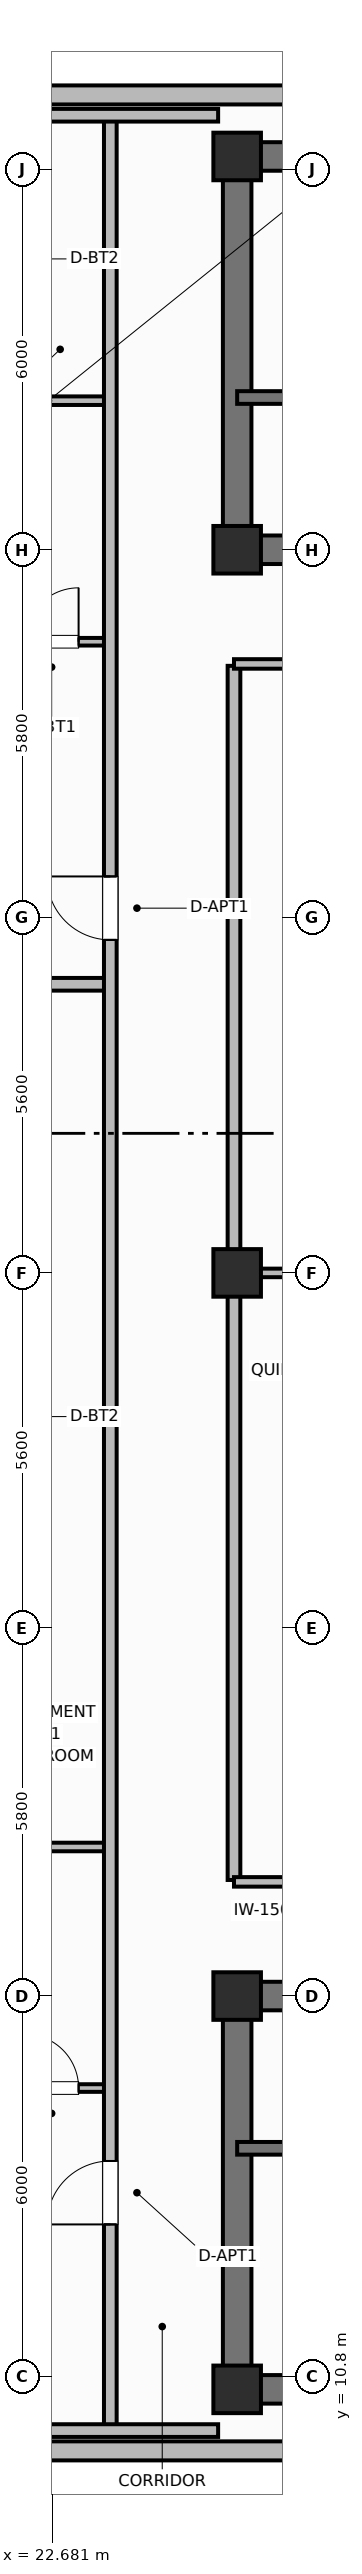
"""IFC4 building model, lengths in metres.
Left out: names, types, materials, properties, quantities, classifications, styles, units other than length and angle.
Written with IfcOpenShell. Run it as: python <this file> out.ifc"""

import sys

from ifc_helpers import new_model, si_unit, direction, frame, frame_2d, origin, origin_2d, place, context, subcontext, project, spatial, rectangle, extrude, element, fill, save


model = new_model("IFC4")
c1 = context("Model", 3, precision=1e-05, world=origin(), true_north=direction((0.0, 1.0)))
c2 = subcontext(c1, "Body", "Model", "MODEL_VIEW")
j1 = project(units=[si_unit("LENGTHUNIT", "METRE"), si_unit("PLANEANGLEUNIT", "RADIAN")], contexts=[c1])
p1 = place(None, origin())
s1 = spatial("IfcSite", under=j1, at=p1, CompositionType="ELEMENT")
p2 = place(p1, origin())
s2 = spatial("IfcBuilding", under=s1, at=p2, CompositionType="ELEMENT")
p3 = place(p2, frame((0.0, 0.0, 289.8)))
s3 = spatial("IfcBuildingStorey", under=s2, at=p3, CompositionType="ELEMENT", Elevation=289.8)
p4 = place(p3, frame((52.8, 10.6, 0.0), z_axis=(0.0, 0.0, 1.0), x_axis=(-1.0, 0.0, 0.0)))
e1 = element("IfcWall", 1, at=p4, inside=s3, PredefinedType="SHEAR", context=c2, shape_type="SweptSolid", body=[
    extrude(rectangle(XDim=27.2, YDim=0.45, at=frame_2d((13.6, 0.0))), origin(), (0.0, 0.0, 1.0), 3.7),
])
p5 = place(p3, frame((25.6, 10.825, 0.0), z_axis=(0.0, 0.0, 1.0), x_axis=(0.0, 1.0, 0.0)))
e2 = element("IfcWall", 2, at=p5, inside=s3, PredefinedType="SHEAR", context=c2, shape_type="SweptSolid", body=[
    extrude(rectangle(XDim=5.75, YDim=0.45, at=frame_2d((2.875, 0.0))), origin(), (0.0, 0.0, 1.0), 3.7),
])
p6 = place(p3, frame((25.6, 16.8, 0.0), z_axis=(0.0, 0.0, 1.0), x_axis=(1.0, 0.0, 0.0)))
e3 = element("IfcWall", 3, at=p6, inside=s3, PredefinedType="SHEAR", context=c2, shape_type="SweptSolid", body=[
    extrude(rectangle(XDim=27.2, YDim=0.45, at=frame_2d((13.6, 0.0))), origin(), (0.0, 0.0, 1.0), 3.7),
])
p7 = place(p6, frame((1.7, 0.0, 0.0)))
e4 = element("IfcOpeningElement", 4, at=p7, cuts=e3, PredefinedType="OPENING", context=c2, shape_type="SweptSolid", body=[
    extrude(rectangle(XDim=1.1, YDim=2.15, at=frame_2d((0.55, 1.075))), frame((0.0, 0.235, 0.0), z_axis=(0.0, -1.0, 0.0), x_axis=(1.0, 0.0, 0.0)), (0.0, 0.0, 1.0), 0.47),
])
p8 = place(p6, frame((4.45, 0.0, 0.0)))
e5 = element("IfcOpeningElement", 5, at=p8, cuts=e3, PredefinedType="OPENING", context=c2, shape_type="SweptSolid", body=[
    extrude(rectangle(XDim=0.85, YDim=2.1, at=frame_2d((0.425, 1.05))), frame((0.0, 0.235, 0.0), z_axis=(0.0, -1.0, 0.0), x_axis=(1.0, 0.0, 0.0)), (0.0, 0.0, 1.0), 0.47),
])
p9 = place(p6, frame((6.5, 0.0, 0.0)))
e6 = element("IfcOpeningElement", 6, at=p9, cuts=e3, PredefinedType="OPENING", context=c2, shape_type="SweptSolid", body=[
    extrude(rectangle(XDim=0.85, YDim=2.1, at=frame_2d((0.425, 1.05))), frame((0.0, 0.235, 0.0), z_axis=(0.0, -1.0, 0.0), x_axis=(1.0, 0.0, 0.0)), (0.0, 0.0, 1.0), 0.47),
])
p10 = place(p6, frame((13.0, 0.0, 0.0)))
e7 = element("IfcOpeningElement", 7, at=p10, cuts=e3, PredefinedType="OPENING", context=c2, shape_type="SweptSolid", body=[
    extrude(rectangle(XDim=1.2, YDim=2.15, at=frame_2d((0.6, 1.075))), frame((0.0, 0.235, 0.0), z_axis=(0.0, -1.0, 0.0), x_axis=(1.0, 0.0, 0.0)), (0.0, 0.0, 1.0), 0.47),
])
p11 = place(p6, frame((19.8, 0.0, 0.0)))
e8 = element("IfcOpeningElement", 8, at=p11, cuts=e3, PredefinedType="OPENING", context=c2, shape_type="SweptSolid", body=[
    extrude(rectangle(XDim=0.85, YDim=2.1, at=frame_2d((0.425, 1.05))), frame((0.0, 0.235, 0.0), z_axis=(0.0, -1.0, 0.0), x_axis=(1.0, 0.0, 0.0)), (0.0, 0.0, 1.0), 0.47),
])
p12 = place(p6, frame((24.2, 0.0, 0.0)))
e9 = element("IfcOpeningElement", 9, at=p12, cuts=e3, PredefinedType="OPENING", context=c2, shape_type="SweptSolid", body=[
    extrude(rectangle(XDim=0.85, YDim=2.1, at=frame_2d((0.425, 1.05))), frame((0.0, 0.235, 0.0), z_axis=(0.0, -1.0, 0.0), x_axis=(1.0, 0.0, 0.0)), (0.0, 0.0, 1.0), 0.47),
])
p13 = place(p3, frame((25.6, 45.8, 0.0), z_axis=(0.0, 0.0, 1.0), x_axis=(1.0, 0.0, 0.0)))
e10 = element("IfcWall", 10, at=p13, inside=s3, PredefinedType="SHEAR", context=c2, shape_type="SweptSolid", body=[
    extrude(rectangle(XDim=27.2, YDim=0.45, at=frame_2d((13.6, 0.0))), origin(), (0.0, 0.0, 1.0), 3.7),
])
p14 = place(p3, frame((25.6, 39.825, 0.0), z_axis=(0.0, 0.0, 1.0), x_axis=(0.0, 1.0, 0.0)))
e11 = element("IfcWall", 11, at=p14, inside=s3, PredefinedType="SHEAR", context=c2, shape_type="SweptSolid", body=[
    extrude(rectangle(XDim=5.75, YDim=0.45, at=frame_2d((2.875, 0.0))), origin(), (0.0, 0.0, 1.0), 3.7),
])
p15 = place(p3, frame((52.8, 39.6, 0.0), z_axis=(0.0, 0.0, 1.0), x_axis=(-1.0, 0.0, 0.0)))
e12 = element("IfcWall", 12, at=p15, inside=s3, PredefinedType="SHEAR", context=c2, shape_type="SweptSolid", body=[
    extrude(rectangle(XDim=27.2, YDim=0.45, at=frame_2d((13.6, 0.0))), origin(), (0.0, 0.0, 1.0), 3.7),
])
p16 = place(p15, frame((24.3, 0.0, 0.0)))
e13 = element("IfcOpeningElement", 13, at=p16, cuts=e12, PredefinedType="OPENING", context=c2, shape_type="SweptSolid", body=[
    extrude(rectangle(XDim=1.1, YDim=2.15, at=frame_2d((0.55, 1.075))), frame((0.0, 0.235, 0.0), z_axis=(0.0, -1.0, 0.0), x_axis=(1.0, 0.0, 0.0)), (0.0, 0.0, 1.0), 0.47),
])
p17 = place(p15, frame((21.85, 0.0, 0.0)))
e14 = element("IfcOpeningElement", 14, at=p17, cuts=e12, PredefinedType="OPENING", context=c2, shape_type="SweptSolid", body=[
    extrude(rectangle(XDim=0.85, YDim=2.1, at=frame_2d((0.425, 1.05))), frame((0.0, 0.235, 0.0), z_axis=(0.0, -1.0, 0.0), x_axis=(1.0, 0.0, 0.0)), (0.0, 0.0, 1.0), 0.47),
])
p18 = place(p15, frame((19.85, 0.0, 0.0)))
e15 = element("IfcOpeningElement", 15, at=p18, cuts=e12, PredefinedType="OPENING", context=c2, shape_type="SweptSolid", body=[
    extrude(rectangle(XDim=0.85, YDim=2.1, at=frame_2d((0.425, 1.05))), frame((0.0, 0.235, 0.0), z_axis=(0.0, -1.0, 0.0), x_axis=(1.0, 0.0, 0.0)), (0.0, 0.0, 1.0), 0.47),
])
p19 = place(p15, frame((15.1, 0.0, 0.0)))
e16 = element("IfcOpeningElement", 16, at=p19, cuts=e12, PredefinedType="OPENING", context=c2, shape_type="SweptSolid", body=[
    extrude(rectangle(XDim=1.2, YDim=2.15, at=frame_2d((0.6, 1.075))), frame((0.0, 0.235, 0.0), z_axis=(0.0, -1.0, 0.0), x_axis=(1.0, 0.0, 0.0)), (0.0, 0.0, 1.0), 0.47),
])
p20 = place(p15, frame((12.6, 0.0, 0.0)))
e17 = element("IfcOpeningElement", 17, at=p20, cuts=e12, PredefinedType="OPENING", context=c2, shape_type="SweptSolid", body=[
    extrude(rectangle(XDim=0.85, YDim=2.1, at=frame_2d((0.425, 1.05))), frame((0.0, 0.235, 0.0), z_axis=(0.0, -1.0, 0.0), x_axis=(1.0, 0.0, 0.0)), (0.0, 0.0, 1.0), 0.47),
])
p21 = place(p15, frame((10.85, 0.0, 0.0)))
e18 = element("IfcOpeningElement", 18, at=p21, cuts=e12, PredefinedType="OPENING", context=c2, shape_type="SweptSolid", body=[
    extrude(rectangle(XDim=0.85, YDim=2.1, at=frame_2d((0.425, 1.05))), frame((0.0, 0.235, 0.0), z_axis=(0.0, -1.0, 0.0), x_axis=(1.0, 0.0, 0.0)), (0.0, 0.0, 1.0), 0.47),
])
p22 = place(p15, frame((7.35, 0.0, 0.0)))
e19 = element("IfcOpeningElement", 19, at=p22, cuts=e12, PredefinedType="OPENING", context=c2, shape_type="SweptSolid", body=[
    extrude(rectangle(XDim=0.85, YDim=2.1, at=frame_2d((0.425, 1.05))), frame((0.0, 0.235, 0.0), z_axis=(0.0, -1.0, 0.0), x_axis=(1.0, 0.0, 0.0)), (0.0, 0.0, 1.0), 0.47),
])
p23 = place(p15, frame((4.2, 0.0, 0.0)))
e20 = element("IfcOpeningElement", 20, at=p23, cuts=e12, PredefinedType="OPENING", context=c2, shape_type="SweptSolid", body=[
    extrude(rectangle(XDim=1.3, YDim=2.2, at=frame_2d((0.65, 1.1))), frame((0.0, 0.235, 0.0), z_axis=(0.0, -1.0, 0.0), x_axis=(1.0, 0.0, 0.0)), (0.0, 0.0, 1.0), 0.47),
])
for number, where, z_axis, x_axis in (
    (21, (25.6, 10.6, 0.0), (0.0, 0.0, 1.0), (1.0, 0.0, 0.0)),
    (22, (25.6, 16.8, 0.0), (0.0, 0.0, 1.0), (1.0, 0.0, 0.0)),
    (23, (25.6, 39.6, 0.0), (0.0, 0.0, 1.0), (1.0, 0.0, 0.0)),
    (24, (25.6, 45.8, 0.0), (0.0, 0.0, 1.0), (1.0, 0.0, 0.0)),
    (25, (25.6, 28.2, 0.0), (0.0, 0.0, 1.0), (1.0, 0.0, 0.0)),
):
    element("IfcColumn", number, at=place(p3, frame(where, z_axis=z_axis, x_axis=x_axis)), inside=s3, PredefinedType="COLUMN", context=c2, shape_type="SweptSolid", body=[
        extrude(rectangle(XDim=0.75, YDim=0.75, at=origin_2d()), origin(), (0.0, 0.0, 1.0), 3.7),
    ])
p24 = place(p3, frame((22.56, 9.63, 0.0), z_axis=(0.0, 0.0, 1.0), x_axis=(1.0, 0.0, 0.0)))
e26 = element("IfcWall", 26, at=p24, inside=s3, PredefinedType="SOLIDWALL", context=c2, shape_type="SweptSolid", body=[
    extrude(rectangle(XDim=4.45, YDim=0.3, at=frame_2d((2.225, 0.0))), origin(), (0.0, 0.0, 1.0), 2.73),
])
p25 = place(p3, frame((48.19, 46.77, 0.0), z_axis=(0.0, 0.0, 1.0), x_axis=(-1.0, 0.0, 0.0)))
e27 = element("IfcWall", 27, at=p25, inside=s3, PredefinedType="SOLIDWALL", context=c2, shape_type="SweptSolid", body=[
    extrude(rectangle(XDim=25.63, YDim=0.3, at=frame_2d((12.815, 0.0))), origin(), (0.0, 0.0, 1.0), 2.73),
])
p26 = place(p25, frame((1.371, 0.0, 0.71)))
e28 = element("IfcOpeningElement", 28, at=p26, cuts=e27, PredefinedType="OPENING", context=c2, shape_type="SweptSolid", body=[
    extrude(rectangle(XDim=1.6, YDim=1.9, at=frame_2d((0.8, 0.95))), frame((0.0, 0.16, 0.0), z_axis=(0.0, -1.0, 0.0), x_axis=(1.0, 0.0, 0.0)), (0.0, 0.0, 1.0), 0.32),
])
p27 = place(p25, frame((7.453, 0.0, 0.71)))
e29 = element("IfcOpeningElement", 29, at=p27, cuts=e27, PredefinedType="OPENING", context=c2, shape_type="SweptSolid", body=[
    extrude(rectangle(XDim=1.6, YDim=1.9, at=frame_2d((0.8, 0.95))), frame((0.0, 0.16, 0.0), z_axis=(0.0, -1.0, 0.0), x_axis=(1.0, 0.0, 0.0)), (0.0, 0.0, 1.0), 0.32),
])
p28 = place(p25, frame((10.144, 0.0, 0.71)))
e30 = element("IfcOpeningElement", 30, at=p28, cuts=e27, PredefinedType="OPENING", context=c2, shape_type="SweptSolid", body=[
    extrude(rectangle(XDim=1.6, YDim=1.9, at=frame_2d((0.8, 0.95))), frame((0.0, 0.16, 0.0), z_axis=(0.0, -1.0, 0.0), x_axis=(1.0, 0.0, 0.0)), (0.0, 0.0, 1.0), 0.32),
])
p29 = place(p25, frame((14.586, 0.0, 0.71)))
e31 = element("IfcOpeningElement", 31, at=p29, cuts=e27, PredefinedType="OPENING", context=c2, shape_type="SweptSolid", body=[
    extrude(rectangle(XDim=1.6, YDim=1.9, at=frame_2d((0.8, 0.95))), frame((0.0, 0.16, 0.0), z_axis=(0.0, -1.0, 0.0), x_axis=(1.0, 0.0, 0.0)), (0.0, 0.0, 1.0), 0.32),
])
p30 = place(p25, frame((16.927, 0.0, 0.71)))
e32 = element("IfcOpeningElement", 32, at=p30, cuts=e27, PredefinedType="OPENING", context=c2, shape_type="SweptSolid", body=[
    extrude(rectangle(XDim=1.6, YDim=1.9, at=frame_2d((0.8, 0.95))), frame((0.0, 0.16, 0.0), z_axis=(0.0, -1.0, 0.0), x_axis=(1.0, 0.0, 0.0)), (0.0, 0.0, 1.0), 0.32),
])
p31 = place(p25, frame((19.618, 0.0, 0.71)))
e33 = element("IfcOpeningElement", 33, at=p31, cuts=e27, PredefinedType="OPENING", context=c2, shape_type="SweptSolid", body=[
    extrude(rectangle(XDim=1.6, YDim=1.9, at=frame_2d((0.8, 0.95))), frame((0.0, 0.16, 0.0), z_axis=(0.0, -1.0, 0.0), x_axis=(1.0, 0.0, 0.0)), (0.0, 0.0, 1.0), 0.32),
])
p32 = place(p3, frame((25.6, 14.4, 0.0), z_axis=(0.0, 0.0, 1.0), x_axis=(1.0, 0.0, 0.0)))
e34 = element("IfcWall", 34, at=p32, inside=s3, PredefinedType="SHEAR", context=c2, shape_type="SweptSolid", body=[
    extrude(rectangle(XDim=9.55, YDim=0.2, at=frame_2d((4.775, 0.0))), origin(), (0.0, 0.0, 1.0), 3.7),
])
p33 = place(p32, frame((1.05, 0.0, 0.0)))
e35 = element("IfcOpeningElement", 35, at=p33, cuts=e34, PredefinedType="OPENING", context=c2, shape_type="SweptSolid", body=[
    extrude(rectangle(XDim=1.1, YDim=2.15, at=frame_2d((0.55, 1.075))), frame((0.0, 0.11, 0.0), z_axis=(0.0, -1.0, 0.0), x_axis=(1.0, 0.0, 0.0)), (0.0, 0.0, 1.0), 0.22),
])
p34 = place(p3, frame((35.15, 42.0, 0.0), z_axis=(0.0, 0.0, 1.0), x_axis=(-1.0, 0.0, 0.0)))
e36 = element("IfcWall", 36, at=p34, inside=s3, PredefinedType="SHEAR", context=c2, shape_type="SweptSolid", body=[
    extrude(rectangle(XDim=9.55, YDim=0.2, at=frame_2d((4.775, 0.0))), origin(), (0.0, 0.0, 1.0), 3.7),
])
p35 = place(p34, frame((7.25, 0.0, 0.0)))
e37 = element("IfcOpeningElement", 37, at=p35, cuts=e36, PredefinedType="OPENING", context=c2, shape_type="SweptSolid", body=[
    extrude(rectangle(XDim=1.1, YDim=2.15, at=frame_2d((0.55, 1.075))), frame((0.0, 0.11, 0.0), z_axis=(0.0, -1.0, 0.0), x_axis=(1.0, 0.0, 0.0)), (0.0, 0.0, 1.0), 0.22),
])
p36 = place(p3, frame((25.55, 18.63, 0.0), z_axis=(0.0, 0.0, 1.0), x_axis=(0.0, 1.0, 0.0)))
e38 = element("IfcWall", 38, at=p36, inside=s3, PredefinedType="PARTITIONING", context=c2, shape_type="SweptSolid", body=[
    extrude(rectangle(XDim=19.14, YDim=0.2, at=frame_2d((9.57, 0.0))), origin(), (0.0, 0.0, 1.0), 2.56),
])
for number, where, z_axis, x_axis in (
    (39, (25.55, 18.6, 0.0), (0.0, 0.0, 1.0), (1.0, 0.0, 0.0)),
    (40, (25.55, 37.8, 0.0), (0.0, 0.0, 1.0), (1.0, 0.0, 0.0)),
):
    element("IfcWall", number, at=place(p3, frame(where, z_axis=z_axis, x_axis=x_axis)), inside=s3, PredefinedType="PARTITIONING", context=c2, shape_type="SweptSolid", body=[
        extrude(rectangle(XDim=2.7, YDim=0.15, at=frame_2d((1.35, 0.0))), origin(), (0.0, 0.0, 1.0), 2.56),
    ])
p37 = place(p3, frame((25.6, 28.2, 0.0), z_axis=(0.0, 0.0, 1.0), x_axis=(1.0, 0.0, 0.0)))
e41 = element("IfcWall", 41, at=p37, inside=s3, PredefinedType="PARTITIONING", context=c2, shape_type="SweptSolid", body=[
    extrude(rectangle(XDim=2.66, YDim=0.135, at=frame_2d((1.33, 0.0))), origin(), (0.0, 0.0, 1.0), 2.56),
])
p38 = place(p3, frame((21.65, 15.35, 0.0), z_axis=(0.0, 0.0, 1.0), x_axis=(1.0, 0.0, 0.0)))
e42 = element("IfcWall", 42, at=p38, inside=s3, PredefinedType="PARTITIONING", context=c2, shape_type="SweptSolid", body=[
    extrude(rectangle(XDim=1.95, YDim=0.12, at=frame_2d((0.975, 0.0))), origin(), (0.0, 0.0, 1.0), 2.56),
])
p39 = place(p38, frame((0.6, 0.0, 0.0)))
e43 = element("IfcOpeningElement", 43, at=p39, cuts=e42, PredefinedType="OPENING", context=c2, shape_type="SweptSolid", body=[
    extrude(rectangle(XDim=0.85, YDim=2.1, at=frame_2d((0.425, 1.05))), frame((0.0, 0.07, 0.0), z_axis=(0.0, -1.0, 0.0), x_axis=(1.0, 0.0, 0.0)), (0.0, 0.0, 1.0), 0.14),
])
p40 = place(p3, frame((21.65, 19.15, 0.0), z_axis=(0.0, 0.0, 1.0), x_axis=(1.0, 0.0, 0.0)))
e44 = element("IfcWall", 44, at=p40, inside=s3, PredefinedType="PARTITIONING", context=c2, shape_type="SweptSolid", body=[
    extrude(rectangle(XDim=1.95, YDim=0.135, at=frame_2d((0.975, 0.0))), origin(), (0.0, 0.0, 1.0), 2.56),
])
p41 = place(p3, frame((19.53, 32.75, 0.0), z_axis=(0.0, 0.0, 1.0), x_axis=(1.0, 0.0, 0.0)))
e45 = element("IfcWall", 45, at=p41, inside=s3, PredefinedType="PARTITIONING", context=c2, shape_type="SweptSolid", body=[
    extrude(rectangle(XDim=4.07, YDim=0.2, at=frame_2d((2.035, 0.0))), origin(), (0.0, 0.0, 1.0), 2.56),
])
p42 = place(p3, frame((21.65, 38.15, 0.0), z_axis=(0.0, 0.0, 1.0), x_axis=(1.0, 0.0, 0.0)))
e46 = element("IfcWall", 46, at=p42, inside=s3, PredefinedType="PARTITIONING", context=c2, shape_type="SweptSolid", body=[
    extrude(rectangle(XDim=1.95, YDim=0.12, at=frame_2d((0.975, 0.0))), origin(), (0.0, 0.0, 1.0), 2.56),
])
p43 = place(p42, frame((0.6, 0.0, 0.0)))
e47 = element("IfcOpeningElement", 47, at=p43, cuts=e46, PredefinedType="OPENING", context=c2, shape_type="SweptSolid", body=[
    extrude(rectangle(XDim=0.85, YDim=2.1, at=frame_2d((0.425, 1.05))), frame((0.0, 0.07, 0.0), z_axis=(0.0, -1.0, 0.0), x_axis=(1.0, 0.0, 0.0)), (0.0, 0.0, 1.0), 0.14),
])
p44 = place(p3, frame((21.65, 41.95, 0.0), z_axis=(0.0, 0.0, 1.0), x_axis=(1.0, 0.0, 0.0)))
e48 = element("IfcWall", 48, at=p44, inside=s3, PredefinedType="PARTITIONING", context=c2, shape_type="SweptSolid", body=[
    extrude(rectangle(XDim=1.95, YDim=0.135, at=frame_2d((0.975, 0.0))), origin(), (0.0, 0.0, 1.0), 2.56),
])
p45 = place(p3, frame((23.6, 9.95, 0.0), z_axis=(0.0, 0.0, 1.0), x_axis=(0.0, 1.0, 0.0)))
e49 = element("IfcWall", 49, at=p45, inside=s3, PredefinedType="PARTITIONING", context=c2, shape_type="SweptSolid", body=[
    extrude(rectangle(XDim=36.5, YDim=0.2, at=frame_2d((18.25, 0.0))), origin(), (0.0, 0.0, 1.0), 2.56),
])
p46 = place(p45, frame((3.25, 0.0, 0.0)))
e50 = element("IfcOpeningElement", 50, at=p46, cuts=e49, PredefinedType="OPENING", context=c2, shape_type="SweptSolid", body=[
    extrude(rectangle(XDim=1.0, YDim=2.15, at=frame_2d((0.5, 1.075))), frame((0.0, 0.11, 0.0), z_axis=(0.0, -1.0, 0.0), x_axis=(1.0, 0.0, 0.0)), (0.0, 0.0, 1.0), 0.22),
])
p47 = place(p45, frame((23.5, 0.0, 0.0)))
e51 = element("IfcOpeningElement", 51, at=p47, cuts=e49, PredefinedType="OPENING", context=c2, shape_type="SweptSolid", body=[
    extrude(rectangle(XDim=1.0, YDim=2.15, at=frame_2d((0.5, 1.075))), frame((0.0, 0.11, 0.0), z_axis=(0.0, -1.0, 0.0), x_axis=(1.0, 0.0, 0.0)), (0.0, 0.0, 1.0), 0.22),
])
for number, where, z_axis, x_axis in (
    (52, (21.546, 9.95, 0.0), (0.0, 0.0, 1.0), (1.0, 0.0, 0.0)),
    (53, (21.546, 46.45, 0.0), (0.0, 0.0, 1.0), (1.0, 0.0, 0.0)),
):
    element("IfcWall", number, at=place(p3, frame(where, z_axis=z_axis, x_axis=x_axis)), inside=s3, PredefinedType="PARTITIONING", context=c2, shape_type="SweptSolid", body=[
        extrude(rectangle(XDim=3.754, YDim=0.2, at=frame_2d((1.877, 0.0))), origin(), (0.0, 0.0, 1.0), 2.56),
    ])
p48 = place(p39, origin())
e54 = element("IfcDoor", 54, at=p48, inside=s3, OperationType="SINGLE_SWING_LEFT", PredefinedType="DOOR", context=c2, shape_type="SweptSolid", body=[
    extrude(rectangle(XDim=0.85, YDim=2.1, at=frame_2d((0.425, 1.05))), frame((0.0, 0.025, 0.0), z_axis=(0.0, -1.0, 0.0), x_axis=(1.0, 0.0, 0.0)), (0.0, 0.0, 1.0), 0.05),
])
fill(e43, e54)
p49 = place(p43, origin())
e55 = element("IfcDoor", 55, at=p49, inside=s3, OperationType="SINGLE_SWING_RIGHT", PredefinedType="DOOR", context=c2, shape_type="SweptSolid", body=[
    extrude(rectangle(XDim=0.85, YDim=2.1, at=frame_2d((0.425, 1.05))), frame((0.0, 0.025, 0.0), z_axis=(0.0, -1.0, 0.0), x_axis=(1.0, 0.0, 0.0)), (0.0, 0.0, 1.0), 0.05),
])
fill(e47, e55)
p50 = place(p46, origin())
e56 = element("IfcDoor", 56, at=p50, inside=s3, OperationType="SINGLE_SWING_LEFT", PredefinedType="DOOR", context=c2, shape_type="SweptSolid", body=[
    extrude(rectangle(XDim=1.0, YDim=2.15, at=frame_2d((0.5, 1.075))), frame((0.0, 0.025, 0.0), z_axis=(0.0, -1.0, 0.0), x_axis=(1.0, 0.0, 0.0)), (0.0, 0.0, 1.0), 0.05),
])
fill(e50, e56)
p51 = place(p47, origin())
e57 = element("IfcDoor", 57, at=p51, inside=s3, OperationType="SINGLE_SWING_RIGHT", PredefinedType="DOOR", context=c2, shape_type="SweptSolid", body=[
    extrude(rectangle(XDim=1.0, YDim=2.15, at=frame_2d((0.5, 1.075))), frame((0.0, 0.025, 0.0), z_axis=(0.0, -1.0, 0.0), x_axis=(1.0, 0.0, 0.0)), (0.0, 0.0, 1.0), 0.05),
])
fill(e51, e57)
save(model, sys.argv[1])
